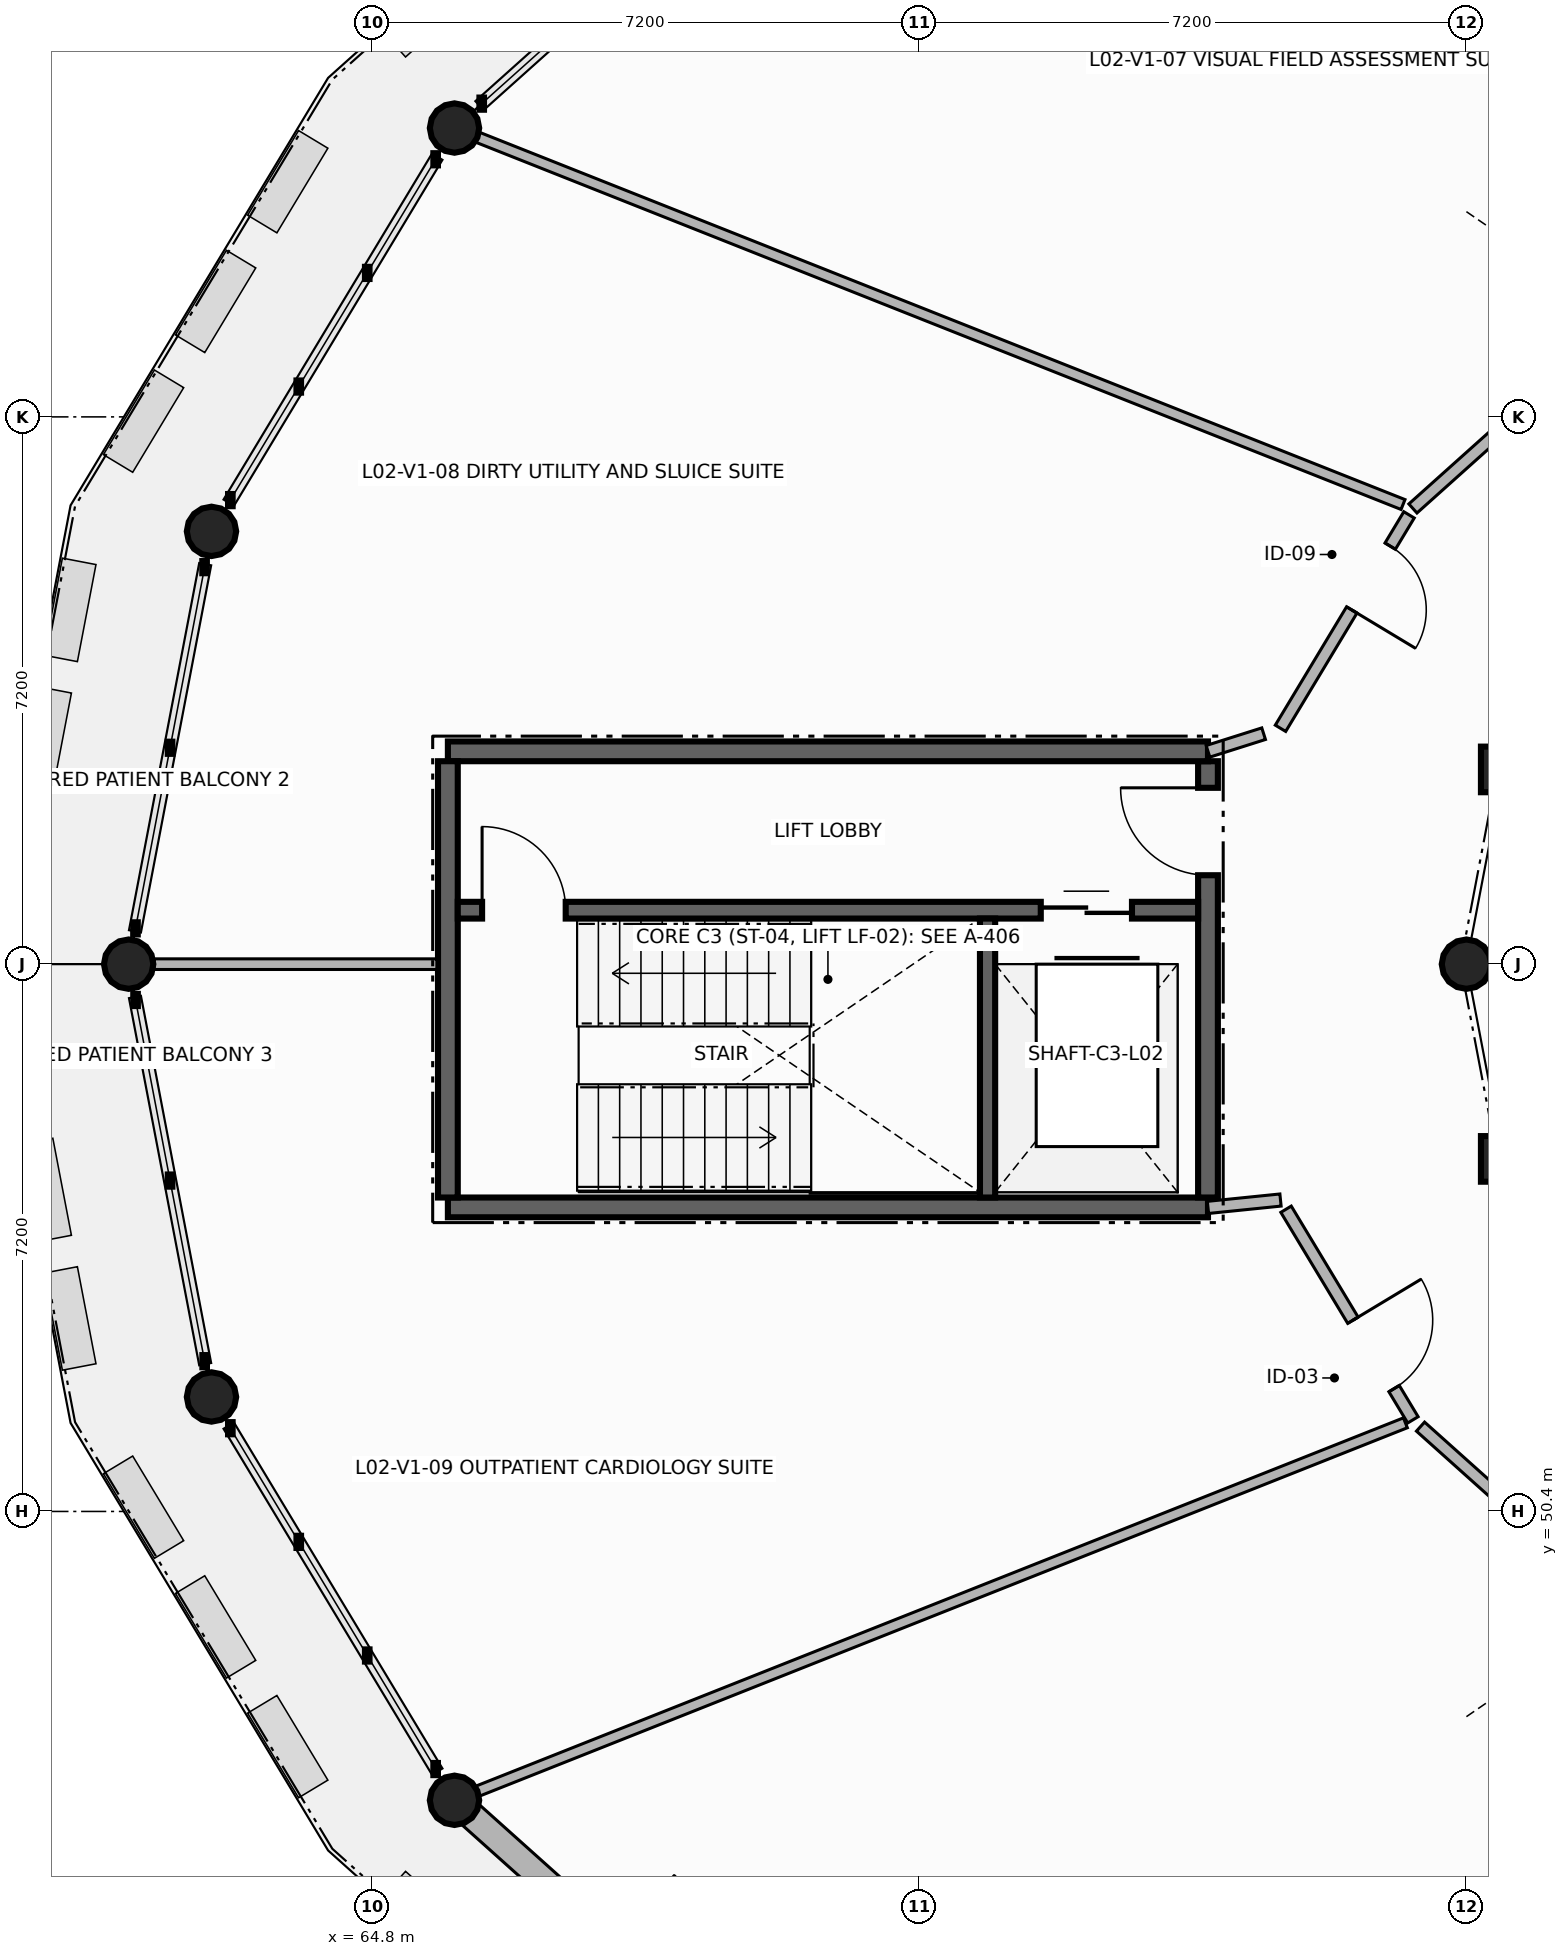
"""IFC4 building model, lengths in metres.
Left out: names, types, materials, properties, quantities, classifications, styles, units other than length and angle.
Written with IfcOpenShell. Run it as: python <this file> out.ifc"""

import sys

from ifc_helpers import new_model, si_unit, direction, frame, frame_2d, origin, origin_2d, place, context, subcontext, project, spatial, rectangle, circle, extrude, element, fill, save


model = new_model("IFC4")
c1 = context("Model", 3, precision=1e-05, world=origin(), true_north=direction((0.0, 1.0)))
c2 = subcontext(c1, "Body", "Model", "MODEL_VIEW")
j1 = project(units=[si_unit("LENGTHUNIT", "METRE"), si_unit("PLANEANGLEUNIT", "RADIAN")], contexts=[c1])
p1 = place(None, origin())
s1 = spatial("IfcSite", under=j1, at=p1, CompositionType="ELEMENT")
p2 = place(p1, origin())
s2 = spatial("IfcBuilding", under=s1, at=p2, CompositionType="ELEMENT")
p3 = place(p2, frame((0.0, 0.0, 8.4)))
s3 = spatial("IfcBuildingStorey", under=s2, at=p3, CompositionType="ELEMENT", Elevation=8.4)
for number, where, z_axis, x_axis in (
    (1, (65.887, 68.6, 0.0), (0.0, 0.0, 1.0), (1.0, 0.0, 0.0)),
    (2, (62.69, 63.294, 0.0), (0.0, 0.0, 1.0), (1.0, 0.0, 0.0)),
):
    element("IfcColumn", number, at=place(p3, frame(where, z_axis=z_axis, x_axis=x_axis)), inside=s3, PredefinedType="COLUMN", context=c2, shape_type="SweptSolid", body=[
        extrude(circle(Radius=0.325, at=origin_2d()), origin(), (0.0, 0.0, 1.0), 3.61),
    ])
p4 = place(p3, frame((79.691, 60.162, 0.0), z_axis=(0.0, 0.0, 1.0), x_axis=(1.0, 0.0, 0.0)))
e3 = element("IfcColumn", 3, at=p4, inside=s3, PredefinedType="COLUMN", context=c2, shape_type="SweptSolid", body=[
    extrude(rectangle(XDim=0.6, YDim=0.6, at=origin_2d()), origin(), (0.0, 0.0, 1.0), 3.61),
])
for number, where, z_axis, x_axis in (
    (4, (61.6, 57.6, 0.0), (0.0, 0.0, 1.0), (1.0, 0.0, 0.0)),
    (5, (79.2, 57.6, 0.0), (0.0, 0.0, 1.0), (1.0, 0.0, 0.0)),
    (6, (62.69, 51.906, 0.0), (0.0, 0.0, 1.0), (1.0, 0.0, 0.0)),
):
    element("IfcColumn", number, at=place(p3, frame(where, z_axis=z_axis, x_axis=x_axis)), inside=s3, PredefinedType="COLUMN", context=c2, shape_type="SweptSolid", body=[
        extrude(circle(Radius=0.325, at=origin_2d()), origin(), (0.0, 0.0, 1.0), 3.61),
    ])
p5 = place(p3, frame((79.691, 55.038, 0.0), z_axis=(0.0, 0.0, 1.0), x_axis=(1.0, 0.0, 0.0)))
e7 = element("IfcColumn", 7, at=p5, inside=s3, PredefinedType="COLUMN", context=c2, shape_type="SweptSolid", body=[
    extrude(rectangle(XDim=0.6, YDim=0.6, at=origin_2d()), origin(), (0.0, 0.0, 1.0), 3.61),
])
p6 = place(p3, frame((65.887, 46.6, 0.0), z_axis=(0.0, 0.0, 1.0), x_axis=(1.0, 0.0, 0.0)))
e8 = element("IfcColumn", 8, at=p6, inside=s3, PredefinedType="COLUMN", context=c2, shape_type="SweptSolid", body=[
    extrude(circle(Radius=0.325, at=origin_2d()), origin(), (0.0, 0.0, 1.0), 3.61),
])
p7 = place(p3, frame((65.887, 46.6, 0.0), z_axis=(0.0, 0.0, 1.0), x_axis=(0.744835335723, -0.667248321585, 0.0)))
e9 = element("IfcWall", 9, at=p7, inside=s3, PredefinedType="SOLIDWALL", context=c2, shape_type="SweptSolid", body=[
    extrude(rectangle(XDim=6.828, YDim=0.35, at=frame_2d((3.414, 0.0))), origin(), (0.0, 0.0, 1.0), 3.05),
])
p8 = place(p7, frame((2.814, 0.0, 0.0)))
e10 = element("IfcOpeningElement", 10, at=p8, cuts=e9, PredefinedType="OPENING", context=c2, shape_type="SweptSolid", body=[
    extrude(rectangle(XDim=1.2, YDim=2.3, at=frame_2d((0.6, 1.15))), frame((0.0, 0.185, 0.0), z_axis=(0.0, -1.0, 0.0), x_axis=(1.0, 0.0, 0.0)), (0.0, 0.0, 1.0), 0.37),
])
p9 = place(p3, frame((65.8, 54.4, 0.0), z_axis=(0.0, 0.0, 1.0), x_axis=(1.0, 0.0, 0.0)))
e11 = element("IfcWall", 11, at=p9, inside=s3, PredefinedType="SHEAR", context=c2, shape_type="SweptSolid", body=[
    extrude(rectangle(XDim=10.0, YDim=0.26, at=frame_2d((5.0, 0.0))), origin(), (0.0, 0.0, 1.0), 3.61),
])
p10 = place(p3, frame((75.8, 54.53, 0.0), z_axis=(0.0, 0.0, 1.0), x_axis=(0.0, 1.0, 0.0)))
e12 = element("IfcWall", 12, at=p10, inside=s3, PredefinedType="SHEAR", context=c2, shape_type="SweptSolid", body=[
    extrude(rectangle(XDim=5.74, YDim=0.26, at=frame_2d((2.87, 0.0))), origin(), (0.0, 0.0, 1.0), 3.61),
])
p11 = place(p10, frame((4.24, 0.0, 0.0)))
e13 = element("IfcOpeningElement", 13, at=p11, cuts=e12, PredefinedType="OPENING", context=c2, shape_type="SweptSolid", body=[
    extrude(rectangle(XDim=1.15, YDim=2.2, at=frame_2d((0.575, 1.1))), frame((0.0, 0.14, 0.0), z_axis=(0.0, -1.0, 0.0), x_axis=(1.0, 0.0, 0.0)), (0.0, 0.0, 1.0), 0.28),
])
p12 = place(p3, frame((75.8, 60.4, 0.0), z_axis=(0.0, 0.0, 1.0), x_axis=(-1.0, 0.0, 0.0)))
e14 = element("IfcWall", 14, at=p12, inside=s3, PredefinedType="SHEAR", context=c2, shape_type="SweptSolid", body=[
    extrude(rectangle(XDim=10.0, YDim=0.26, at=frame_2d((5.0, 0.0))), origin(), (0.0, 0.0, 1.0), 3.61),
])
p13 = place(p3, frame((65.8, 60.27, 0.0), z_axis=(0.0, 0.0, 1.0), x_axis=(0.0, -1.0, 0.0)))
e15 = element("IfcWall", 15, at=p13, inside=s3, PredefinedType="SHEAR", context=c2, shape_type="SweptSolid", body=[
    extrude(rectangle(XDim=5.74, YDim=0.26, at=frame_2d((2.87, 0.0))), origin(), (0.0, 0.0, 1.0), 3.61),
])
p14 = place(p3, frame((65.93, 58.31, 0.0), z_axis=(0.0, 0.0, 1.0), x_axis=(1.0, 0.0, 0.0)))
e16 = element("IfcWall", 16, at=p14, inside=s3, PredefinedType="SHEAR", context=c2, shape_type="SweptSolid", body=[
    extrude(rectangle(XDim=9.74, YDim=0.22, at=frame_2d((4.87, 0.0))), origin(), (0.0, 0.0, 1.0), 3.61),
])
p15 = place(p14, frame((0.32, 0.0, 0.0)))
e17 = element("IfcOpeningElement", 17, at=p15, cuts=e16, PredefinedType="OPENING", context=c2, shape_type="SweptSolid", body=[
    extrude(rectangle(XDim=1.1, YDim=2.15, at=frame_2d((0.55, 1.075))), frame((0.0, 0.12, 0.0), z_axis=(0.0, -1.0, 0.0), x_axis=(1.0, 0.0, 0.0)), (0.0, 0.0, 1.0), 0.24),
])
p16 = place(p14, frame((7.67, 0.0, 0.0)))
e18 = element("IfcOpeningElement", 18, at=p16, cuts=e16, PredefinedType="OPENING", context=c2, shape_type="SweptSolid", body=[
    extrude(rectangle(XDim=1.2, YDim=2.2, at=frame_2d((0.6, 1.1))), frame((0.0, 0.12, 0.0), z_axis=(0.0, -1.0, 0.0), x_axis=(1.0, 0.0, 0.0)), (0.0, 0.0, 1.0), 0.24),
])
p17 = place(p3, frame((72.9, 54.53, 0.0), z_axis=(0.0, 0.0, 1.0), x_axis=(0.0, 1.0, 0.0)))
e19 = element("IfcWall", 19, at=p17, inside=s3, PredefinedType="SHEAR", context=c2, shape_type="SweptSolid", body=[
    extrude(rectangle(XDim=3.67, YDim=0.2, at=frame_2d((1.835, 0.0))), origin(), (0.0, 0.0, 1.0), 3.61),
])
p18 = place(p3, frame((84.794, 68.087, 0.0), z_axis=(0.0, 0.0, 1.0), x_axis=(-0.643158316092, 0.765733230598, 0.0)))
e20 = element("IfcWall", 20, at=p18, inside=s3, PredefinedType="PARTITIONING", context=c2, shape_type="SweptSolid", body=[
    extrude(rectangle(XDim=10.851, YDim=0.14, at=frame_2d((5.426, 0.0))), origin(), (0.0, 0.0, 1.0), 2.99),
])
p19 = place(p3, frame((81.259, 66.07, 0.0), z_axis=(0.0, 0.0, 1.0), x_axis=(-0.744840105901, -0.667242996697, 0.0)))
e21 = element("IfcWall", 21, at=p19, inside=s3, PredefinedType="PARTITIONING", context=c2, shape_type="SweptSolid", body=[
    extrude(rectangle(XDim=3.709, YDim=0.16, at=frame_2d((1.855, 0.0))), origin(), (0.0, 0.0, 1.0), 2.99),
])
p20 = place(p3, frame((78.366, 63.647, 0.0), z_axis=(0.0, 0.0, 1.0), x_axis=(-0.929476502333, 0.368881324562, 0.0)))
e22 = element("IfcWall", 22, at=p20, inside=s3, PredefinedType="PARTITIONING", context=c2, shape_type="SweptSolid", body=[
    extrude(rectangle(XDim=13.091, YDim=0.14, at=frame_2d((6.546, 0.0))), origin(), (0.0, 0.0, 1.0), 2.99),
])
p21 = place(p3, frame((65.655, 57.6, 0.0), z_axis=(0.0, 0.0, 1.0), x_axis=(-1.0, 0.0, 0.0)))
e23 = element("IfcWall", 23, at=p21, inside=s3, PredefinedType="PARTITIONING", context=c2, shape_type="SweptSolid", body=[
    extrude(rectangle(XDim=3.72, YDim=0.14, at=frame_2d((1.86, 0.0))), origin(), (0.0, 0.0, 1.0), 2.99),
])
p22 = place(p3, frame((78.445, 63.511, 0.0), z_axis=(0.0, 0.0, 1.0), x_axis=(-0.515907945316, -0.856644028731, 0.0)))
e24 = element("IfcWall", 24, at=p22, inside=s3, PredefinedType="PARTITIONING", context=c2, shape_type="SweptSolid", body=[
    extrude(rectangle(XDim=3.278, YDim=0.16, at=frame_2d((1.639, 0.0))), origin(), (0.0, 0.0, 1.0), 2.99),
])
p23 = place(p22, frame((0.48, 0.0, 0.0)))
e25 = element("IfcOpeningElement", 25, at=p23, cuts=e24, PredefinedType="OPENING", context=c2, shape_type="SweptSolid", body=[
    extrude(rectangle(XDim=0.98, YDim=2.15, at=frame_2d((0.49, 1.075))), frame((0.0, 0.09, 0.0), z_axis=(0.0, -1.0, 0.0), x_axis=(1.0, 0.0, 0.0)), (0.0, 0.0, 1.0), 0.18),
])
p24 = place(p3, frame((76.532, 60.632, 0.0), z_axis=(0.0, 0.0, 1.0), x_axis=(-0.953192648892, -0.302363645463, 0.0)))
e26 = element("IfcWall", 26, at=p24, inside=s3, PredefinedType="PARTITIONING", context=c2, shape_type="SweptSolid", body=[
    extrude(rectangle(XDim=0.768, YDim=0.16, at=frame_2d((0.384, 0.0))), origin(), (0.0, 0.0, 1.0), 2.99),
])
p25 = place(p3, frame((75.8, 54.4, 0.0), z_axis=(0.0, 0.0, 1.0), x_axis=(0.994851446462, 0.101343966136, 0.0)))
e27 = element("IfcWall", 27, at=p25, inside=s3, PredefinedType="PARTITIONING", context=c2, shape_type="SweptSolid", body=[
    extrude(rectangle(XDim=0.959, YDim=0.16, at=frame_2d((0.479, 0.0))), origin(), (0.0, 0.0, 1.0), 2.99),
])
p26 = place(p3, frame((76.827, 54.376, 0.0), z_axis=(0.0, 0.0, 1.0), x_axis=(0.515993285702, -0.85659262728, 0.0)))
e28 = element("IfcWall", 28, at=p26, inside=s3, PredefinedType="PARTITIONING", context=c2, shape_type="SweptSolid", body=[
    extrude(rectangle(XDim=3.235, YDim=0.16, at=frame_2d((1.617, 0.0))), origin(), (0.0, 0.0, 1.0), 2.99),
])
p27 = place(p26, frame((1.705, 0.0, 0.0)))
e29 = element("IfcOpeningElement", 29, at=p27, cuts=e28, PredefinedType="OPENING", context=c2, shape_type="SweptSolid", body=[
    extrude(rectangle(XDim=1.05, YDim=2.15, at=frame_2d((0.525, 1.075))), frame((0.0, 0.09, 0.0), z_axis=(0.0, -1.0, 0.0), x_axis=(1.0, 0.0, 0.0)), (0.0, 0.0, 1.0), 0.18),
])
p28 = place(p3, frame((78.397, 51.566, 0.0), z_axis=(0.0, 0.0, 1.0), x_axis=(-0.929434419676, -0.368987343309, 0.0)))
e30 = element("IfcWall", 30, at=p28, inside=s3, PredefinedType="PARTITIONING", context=c2, shape_type="SweptSolid", body=[
    extrude(rectangle(XDim=13.125, YDim=0.14, at=frame_2d((6.562, 0.0))), origin(), (0.0, 0.0, 1.0), 2.99),
])
p29 = place(p3, frame((78.596, 51.516, 0.0), z_axis=(0.0, 0.0, 1.0), x_axis=(0.744797991907, -0.667290005358, 0.0)))
e31 = element("IfcWall", 31, at=p29, inside=s3, PredefinedType="PARTITIONING", context=c2, shape_type="SweptSolid", body=[
    extrude(rectangle(XDim=3.588, YDim=0.16, at=frame_2d((1.794, 0.0))), origin(), (0.0, 0.0, 1.0), 2.99),
])
p30 = place(p3, frame((84.808, 47.131, 0.0), z_axis=(0.0, 0.0, 1.0), x_axis=(-0.643103623671, -0.765779164787, 0.0)))
e32 = element("IfcWall", 32, at=p30, inside=s3, PredefinedType="PARTITIONING", context=c2, shape_type="SweptSolid", body=[
    extrude(rectangle(XDim=10.874, YDim=0.14, at=frame_2d((5.437, 0.0))), origin(), (0.0, 0.0, 1.0), 2.99),
])
p31 = place(p15, origin())
e33 = element("IfcDoor", 33, at=p31, inside=s3, OperationType="SINGLE_SWING_LEFT", PredefinedType="DOOR", context=c2, shape_type="SweptSolid", body=[
    extrude(rectangle(XDim=1.1, YDim=2.15, at=frame_2d((0.55, 1.075))), frame((0.0, 0.025, 0.0), z_axis=(0.0, -1.0, 0.0), x_axis=(1.0, 0.0, 0.0)), (0.0, 0.0, 1.0), 0.05),
])
fill(e17, e33)
p32 = place(p16, origin())
e34 = element("IfcDoor", 34, at=p32, inside=s3, OperationType="DOUBLE_DOOR_SLIDING", PredefinedType="DOOR", context=c2, shape_type="SweptSolid", body=[
    extrude(rectangle(XDim=1.2, YDim=2.2, at=frame_2d((0.6, 1.1))), frame((0.0, 0.025, 0.0), z_axis=(0.0, -1.0, 0.0), x_axis=(1.0, 0.0, 0.0)), (0.0, 0.0, 1.0), 0.05),
])
fill(e18, e34)
p33 = place(p11, origin())
e35 = element("IfcDoor", 35, at=p33, inside=s3, OperationType="SINGLE_SWING_RIGHT", PredefinedType="DOOR", context=c2, shape_type="SweptSolid", body=[
    extrude(rectangle(XDim=1.15, YDim=2.2, at=frame_2d((0.575, 1.1))), frame((0.0, 0.025, 0.0), z_axis=(0.0, -1.0, 0.0), x_axis=(1.0, 0.0, 0.0)), (0.0, 0.0, 1.0), 0.05),
])
fill(e13, e35)
p34 = place(p23, origin())
e36 = element("IfcDoor", 36, at=p34, inside=s3, OperationType="SINGLE_SWING_RIGHT", PredefinedType="DOOR", context=c2, shape_type="SweptSolid", body=[
    extrude(rectangle(XDim=0.98, YDim=2.15, at=frame_2d((0.49, 1.075))), frame((0.0, 0.025, 0.0), z_axis=(0.0, -1.0, 0.0), x_axis=(1.0, 0.0, 0.0)), (0.0, 0.0, 1.0), 0.05),
])
fill(e25, e36)
p35 = place(p27, origin())
e37 = element("IfcDoor", 37, at=p35, inside=s3, OperationType="SINGLE_SWING_LEFT", PredefinedType="DOOR", context=c2, shape_type="SweptSolid", body=[
    extrude(rectangle(XDim=1.05, YDim=2.15, at=frame_2d((0.525, 1.075))), frame((0.0, 0.025, 0.0), z_axis=(0.0, -1.0, 0.0), x_axis=(1.0, 0.0, 0.0)), (0.0, 0.0, 1.0), 0.05),
])
fill(e29, e37)
save(model, sys.argv[1])
